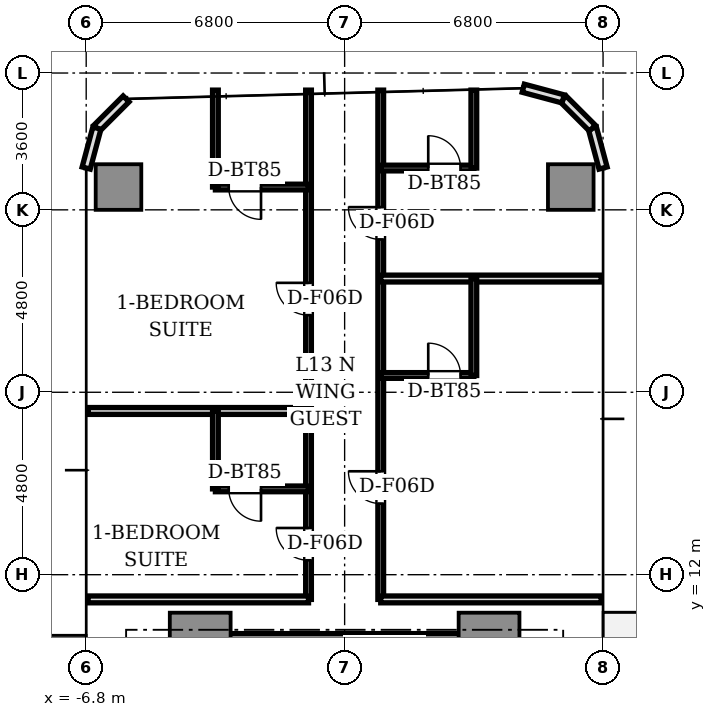
"""IFC4 building model, lengths in metres.
Left out: names, types, materials, properties, quantities, classifications, styles, units other than length and angle.
Written with IfcOpenShell. Run it as: python <this file> out.ifc"""

import sys

from ifc_helpers import new_model, si_unit, direction, frame, frame_2d, origin, origin_2d, place, context, subcontext, project, spatial, rectangle, extrude, source, transform, mapped, element, fill, save


model = new_model("IFC4")
c1 = context("Model", 3, precision=1e-05, world=origin(), true_north=direction((0.0, 1.0)))
c2 = subcontext(c1, "Body", "Model", "MODEL_VIEW")
j1 = project(units=[si_unit("LENGTHUNIT", "METRE"), si_unit("PLANEANGLEUNIT", "RADIAN")], contexts=[c1])
p1 = place(None, origin())
s1 = spatial("IfcSite", under=j1, at=p1, CompositionType="ELEMENT")
p2 = place(p1, origin())
s2 = spatial("IfcBuilding", under=s1, at=p2, CompositionType="ELEMENT")
p3 = place(p2, frame((0.0, 0.0, 51.05)))
s3 = spatial("IfcBuildingStorey", under=s2, at=p3, CompositionType="ELEMENT", Elevation=51.05)
p4 = place(p3, frame((-3.55, 10.2, 0.0), z_axis=(0.0, 0.0, 1.0), x_axis=(1.0, 0.0, 0.0)))
e1 = element("IfcWall", 1, at=p4, inside=s3, PredefinedType="SHEAR", context=c2, shape_type="SweptSolid", body=[
    extrude(rectangle(XDim=7.1, YDim=0.5, at=frame_2d((3.55, 0.0))), origin(), (0.0, 0.0, 1.0), 3.11),
])
m1 = source(origin(), c2, "Body", "SweptSolid", [
    extrude(rectangle(XDim=1.6, YDim=1.6, at=origin_2d()), origin(), (0.0, 0.0, 1.0), 3.11),
])
for number, where, z_axis, x_axis in (
    (2, (-3.8, 10.2, 0.0), (0.0, 0.0, 1.0), (1.0, 0.0, 0.0)),
    (3, (3.8, 10.2, 0.0), (0.0, 0.0, 1.0), (1.0, 0.0, 0.0)),
):
    element("IfcColumn", number, at=place(p3, frame(where, z_axis=z_axis, x_axis=x_axis)), inside=s3, PredefinedType="COLUMN", context=c2, shape_type="MappedRepresentation", body=[
        mapped(m1, transform((0.0, 0.0, 0.0), scale=1.0)),
    ])
m2 = source(origin(), c2, "Body", "SweptSolid", [
    extrude(rectangle(XDim=1.2, YDim=1.2, at=origin_2d()), origin(), (0.0, 0.0, 1.0), 3.11),
])
for number, where, z_axis, x_axis in (
    (4, (5.95, 22.2, 0.0), (0.0, 0.0, 1.0), (1.0, 0.0, 0.0)),
    (5, (-5.95, 22.2, 0.0), (0.0, 0.0, 1.0), (1.0, 0.0, 0.0)),
):
    element("IfcColumn", number, at=place(p3, frame(where, z_axis=z_axis, x_axis=x_axis)), inside=s3, PredefinedType="COLUMN", context=c2, shape_type="MappedRepresentation", body=[
        mapped(m2, transform((0.0, 0.0, 0.0), scale=1.0)),
    ])
for number, where, z_axis, x_axis in (
    (6, (6.8, 22.7, 0.0), (0.0, 0.0, 1.0), (-0.259, 0.966, 0.0)),
    (7, (6.519, 23.75, 0.0), (0.0, 0.0, 1.0), (-0.707, 0.707, 0.0)),
    (8, (5.75, 24.519, 0.0), (0.0, 0.0, 1.0), (-0.966, 0.259, 0.0)),
    (9, (-5.75, 24.519, 0.0), (0.0, 0.0, 1.0), (-0.707, -0.707, 0.0)),
    (10, (-6.519, 23.75, 0.0), (0.0, 0.0, 1.0), (-0.259, -0.966, 0.0)),
):
    element("IfcWall", number, at=place(p3, frame(where, z_axis=z_axis, x_axis=x_axis)), inside=s3, PredefinedType="STANDARD", context=c2, shape_type="SweptSolid", body=[
        extrude(rectangle(XDim=1.087, YDim=0.22, at=frame_2d((0.543, 0.0))), origin(), (0.0, 0.0, 1.0), 3.11),
    ])
p5 = place(p3, frame((-0.95, 11.35, 0.0), z_axis=(0.0, 0.0, 1.0), x_axis=(0.0, 1.0, 0.0)))
e11 = element("IfcWall", 11, at=p5, inside=s3, PredefinedType="PARTITIONING", context=c2, shape_type="SweptSolid", body=[
    extrude(rectangle(XDim=13.4, YDim=0.15, at=frame_2d((6.7, 0.0))), origin(), (0.0, 0.0, 1.0), 2.66),
])
p6 = place(p5, frame((1.029, 0.0, 0.0)))
e12 = element("IfcOpeningElement", 12, at=p6, cuts=e11, PredefinedType="OPENING", context=c2, shape_type="SweptSolid", body=[
    extrude(rectangle(XDim=0.85, YDim=2.1, at=frame_2d((0.425, 1.05))), frame((0.0, 0.085, 0.0), z_axis=(0.0, -1.0, 0.0), x_axis=(1.0, 0.0, 0.0)), (0.0, 0.0, 1.0), 0.17),
])
p7 = place(p5, frame((7.479, 0.0, 0.0)))
e13 = element("IfcOpeningElement", 13, at=p7, cuts=e11, PredefinedType="OPENING", context=c2, shape_type="SweptSolid", body=[
    extrude(rectangle(XDim=0.85, YDim=2.1, at=frame_2d((0.425, 1.05))), frame((0.0, 0.085, 0.0), z_axis=(0.0, -1.0, 0.0), x_axis=(1.0, 0.0, 0.0)), (0.0, 0.0, 1.0), 0.17),
])
p8 = place(p3, frame((0.95, 11.35, 0.0), z_axis=(0.0, 0.0, 1.0), x_axis=(0.0, 1.0, 0.0)))
e14 = element("IfcWall", 14, at=p8, inside=s3, PredefinedType="PARTITIONING", context=c2, shape_type="SweptSolid", body=[
    extrude(rectangle(XDim=13.4, YDim=0.15, at=frame_2d((6.7, 0.0))), origin(), (0.0, 0.0, 1.0), 2.66),
])
p9 = place(p8, frame((2.521, 0.0, 0.0)))
e15 = element("IfcOpeningElement", 15, at=p9, cuts=e14, PredefinedType="OPENING", context=c2, shape_type="SweptSolid", body=[
    extrude(rectangle(XDim=0.85, YDim=2.1, at=frame_2d((0.425, 1.05))), frame((0.0, 0.085, 0.0), z_axis=(0.0, -1.0, 0.0), x_axis=(1.0, 0.0, 0.0)), (0.0, 0.0, 1.0), 0.17),
])
p10 = place(p8, frame((9.471, 0.0, 0.0)))
e16 = element("IfcOpeningElement", 16, at=p10, cuts=e14, PredefinedType="OPENING", context=c2, shape_type="SweptSolid", body=[
    extrude(rectangle(XDim=0.85, YDim=2.1, at=frame_2d((0.425, 1.05))), frame((0.0, 0.085, 0.0), z_axis=(0.0, -1.0, 0.0), x_axis=(1.0, 0.0, 0.0)), (0.0, 0.0, 1.0), 0.17),
])
for number, where, z_axis, x_axis in (
    (17, (-0.95, 11.35, 0.0), (0.0, 0.0, 1.0), (-1.0, 0.0, 0.0)),
    (18, (6.75, 11.35, 0.0), (0.0, 0.0, 1.0), (-1.0, 0.0, 0.0)),
    (19, (-0.95, 16.308, 0.0), (0.0, 0.0, 1.0), (-1.0, 0.0, 0.0)),
):
    element("IfcWall", number, at=place(p3, frame(where, z_axis=z_axis, x_axis=x_axis)), inside=s3, PredefinedType="PARTITIONING", context=c2, shape_type="SweptSolid", body=[
        extrude(rectangle(XDim=5.8, YDim=0.18, at=frame_2d((2.9, 0.0))), origin(), (0.0, 0.0, 1.0), 2.66),
    ])
p11 = place(p3, frame((-0.95, 14.258, 0.0), z_axis=(0.0, 0.0, 1.0), x_axis=(-1.0, 0.0, 0.0)))
e20 = element("IfcWall", 20, at=p11, inside=s3, PredefinedType="PARTITIONING", context=c2, shape_type="SweptSolid", body=[
    extrude(rectangle(XDim=2.45, YDim=0.15, at=frame_2d((1.225, 0.0))), origin(), (0.0, 0.0, 1.0), 2.66),
])
p12 = place(p11, frame((1.25, 0.0, 0.0)))
e21 = element("IfcOpeningElement", 21, at=p12, cuts=e20, PredefinedType="OPENING", context=c2, shape_type="SweptSolid", body=[
    extrude(rectangle(XDim=0.85, YDim=2.1, at=frame_2d((0.425, 1.05))), frame((0.0, 0.085, 0.0), z_axis=(0.0, -1.0, 0.0), x_axis=(1.0, 0.0, 0.0)), (0.0, 0.0, 1.0), 0.17),
])
p13 = place(p3, frame((-3.4, 14.258, 0.0), z_axis=(0.0, 0.0, 1.0), x_axis=(0.0, 1.0, 0.0)))
e22 = element("IfcWall", 22, at=p13, inside=s3, PredefinedType="PARTITIONING", context=c2, shape_type="SweptSolid", body=[
    extrude(rectangle(XDim=2.05, YDim=0.15, at=frame_2d((1.025, 0.0))), origin(), (0.0, 0.0, 1.0), 2.66),
])
p14 = place(p3, frame((-0.95, 22.2, 0.0), z_axis=(0.0, 0.0, 1.0), x_axis=(-1.0, 0.0, 0.0)))
e23 = element("IfcWall", 23, at=p14, inside=s3, PredefinedType="PARTITIONING", context=c2, shape_type="SweptSolid", body=[
    extrude(rectangle(XDim=2.45, YDim=0.15, at=frame_2d((1.225, 0.0))), origin(), (0.0, 0.0, 1.0), 2.58),
])
p15 = place(p14, frame((1.25, 0.0, 0.0)))
e24 = element("IfcOpeningElement", 24, at=p15, cuts=e23, PredefinedType="OPENING", context=c2, shape_type="SweptSolid", body=[
    extrude(rectangle(XDim=0.85, YDim=2.1, at=frame_2d((0.425, 1.05))), frame((0.0, 0.085, 0.0), z_axis=(0.0, -1.0, 0.0), x_axis=(1.0, 0.0, 0.0)), (0.0, 0.0, 1.0), 0.17),
])
p16 = place(p3, frame((-3.4, 22.2, 0.0), z_axis=(0.0, 0.0, 1.0), x_axis=(0.0, 1.0, 0.0)))
e25 = element("IfcWall", 25, at=p16, inside=s3, PredefinedType="PARTITIONING", context=c2, shape_type="SweptSolid", body=[
    extrude(rectangle(XDim=2.55, YDim=0.15, at=frame_2d((1.275, 0.0))), origin(), (0.0, 0.0, 1.0), 2.66),
])
p17 = place(p3, frame((0.95, 19.792, 0.0), z_axis=(0.0, 0.0, 1.0), x_axis=(1.0, 0.0, 0.0)))
e26 = element("IfcWall", 26, at=p17, inside=s3, PredefinedType="PARTITIONING", context=c2, shape_type="SweptSolid", body=[
    extrude(rectangle(XDim=5.8, YDim=0.18, at=frame_2d((2.9, 0.0))), origin(), (0.0, 0.0, 1.0), 2.66),
])
p18 = place(p3, frame((0.95, 17.242, 0.0), z_axis=(0.0, 0.0, 1.0), x_axis=(1.0, 0.0, 0.0)))
e27 = element("IfcWall", 27, at=p18, inside=s3, PredefinedType="PARTITIONING", context=c2, shape_type="SweptSolid", body=[
    extrude(rectangle(XDim=2.45, YDim=0.15, at=frame_2d((1.225, 0.0))), origin(), (0.0, 0.0, 1.0), 2.66),
])
p19 = place(p18, frame((1.25, 0.0, 0.0)))
e28 = element("IfcOpeningElement", 28, at=p19, cuts=e27, PredefinedType="OPENING", context=c2, shape_type="SweptSolid", body=[
    extrude(rectangle(XDim=0.85, YDim=2.1, at=frame_2d((0.425, 1.05))), frame((0.0, 0.085, 0.0), z_axis=(0.0, -1.0, 0.0), x_axis=(1.0, 0.0, 0.0)), (0.0, 0.0, 1.0), 0.17),
])
p20 = place(p3, frame((3.4, 17.242, 0.0), z_axis=(0.0, 0.0, 1.0), x_axis=(0.0, 1.0, 0.0)))
e29 = element("IfcWall", 29, at=p20, inside=s3, PredefinedType="PARTITIONING", context=c2, shape_type="SweptSolid", body=[
    extrude(rectangle(XDim=2.55, YDim=0.15, at=frame_2d((1.275, 0.0))), origin(), (0.0, 0.0, 1.0), 2.66),
])
p21 = place(p3, frame((0.95, 22.7, 0.0), z_axis=(0.0, 0.0, 1.0), x_axis=(1.0, 0.0, 0.0)))
e30 = element("IfcWall", 30, at=p21, inside=s3, PredefinedType="PARTITIONING", context=c2, shape_type="SweptSolid", body=[
    extrude(rectangle(XDim=2.45, YDim=0.15, at=frame_2d((1.225, 0.0))), origin(), (0.0, 0.0, 1.0), 2.66),
])
p22 = place(p21, frame((1.25, 0.0, 0.0)))
e31 = element("IfcOpeningElement", 31, at=p22, cuts=e30, PredefinedType="OPENING", context=c2, shape_type="SweptSolid", body=[
    extrude(rectangle(XDim=0.85, YDim=2.1, at=frame_2d((0.425, 1.05))), frame((0.0, 0.085, 0.0), z_axis=(0.0, -1.0, 0.0), x_axis=(1.0, 0.0, 0.0)), (0.0, 0.0, 1.0), 0.17),
])
p23 = place(p3, frame((3.4, 22.7, 0.0), z_axis=(0.0, 0.0, 1.0), x_axis=(0.0, 1.0, 0.0)))
e32 = element("IfcWall", 32, at=p23, inside=s3, PredefinedType="PARTITIONING", context=c2, shape_type="SweptSolid", body=[
    extrude(rectangle(XDim=2.05, YDim=0.15, at=frame_2d((1.025, 0.0))), origin(), (0.0, 0.0, 1.0), 2.66),
])
m3 = source(origin(), c2, "Body", "SweptSolid", [
    extrude(rectangle(XDim=0.85, YDim=0.05, at=origin_2d()), origin(), (0.0, 0.0, 1.0), 2.1),
])
p24 = place(p12, frame((0.425, 0.0, 0.0)))
e33 = element("IfcDoor", 33, at=p24, inside=s3, OperationType="SINGLE_SWING_LEFT", PredefinedType="DOOR", context=c2, shape_type="MappedRepresentation", body=[
    mapped(m3, transform((0.0, 0.0, 0.0), scale=1.0)),
])
fill(e21, e33)
p25 = place(p6, frame((0.425, 0.0, 0.0)))
e34 = element("IfcDoor", 34, at=p25, inside=s3, OperationType="SINGLE_SWING_RIGHT", PredefinedType="DOOR", context=c2, shape_type="MappedRepresentation", body=[
    mapped(m3, transform((0.0, 0.0, 0.0), scale=1.0)),
])
fill(e12, e34)
p26 = place(p15, frame((0.425, 0.0, 0.0)))
e35 = element("IfcDoor", 35, at=p26, inside=s3, OperationType="SINGLE_SWING_LEFT", PredefinedType="DOOR", context=c2, shape_type="MappedRepresentation", body=[
    mapped(m3, transform((0.0, 0.0, 0.0), scale=1.0)),
])
fill(e24, e35)
p27 = place(p7, frame((0.425, 0.0, 0.0)))
e36 = element("IfcDoor", 36, at=p27, inside=s3, OperationType="SINGLE_SWING_RIGHT", PredefinedType="DOOR", context=c2, shape_type="MappedRepresentation", body=[
    mapped(m3, transform((0.0, 0.0, 0.0), scale=1.0)),
])
fill(e13, e36)
p28 = place(p19, frame((0.425, 0.0, 0.0)))
e37 = element("IfcDoor", 37, at=p28, inside=s3, OperationType="SINGLE_SWING_LEFT", PredefinedType="DOOR", context=c2, shape_type="MappedRepresentation", body=[
    mapped(m3, transform((0.0, 0.0, 0.0), scale=1.0)),
])
fill(e28, e37)
p29 = place(p9, frame((0.425, 0.0, 0.0)))
e38 = element("IfcDoor", 38, at=p29, inside=s3, OperationType="SINGLE_SWING_RIGHT", PredefinedType="DOOR", context=c2, shape_type="MappedRepresentation", body=[
    mapped(m3, transform((0.0, 0.0, 0.0), scale=1.0)),
])
fill(e15, e38)
p30 = place(p22, frame((0.425, 0.0, 0.0)))
e39 = element("IfcDoor", 39, at=p30, inside=s3, OperationType="SINGLE_SWING_LEFT", PredefinedType="DOOR", context=c2, shape_type="MappedRepresentation", body=[
    mapped(m3, transform((0.0, 0.0, 0.0), scale=1.0)),
])
fill(e31, e39)
p31 = place(p10, frame((0.425, 0.0, 0.0)))
e40 = element("IfcDoor", 40, at=p31, inside=s3, OperationType="SINGLE_SWING_RIGHT", PredefinedType="DOOR", context=c2, shape_type="MappedRepresentation", body=[
    mapped(m3, transform((0.0, 0.0, 0.0), scale=1.0)),
])
fill(e16, e40)
save(model, sys.argv[1])
